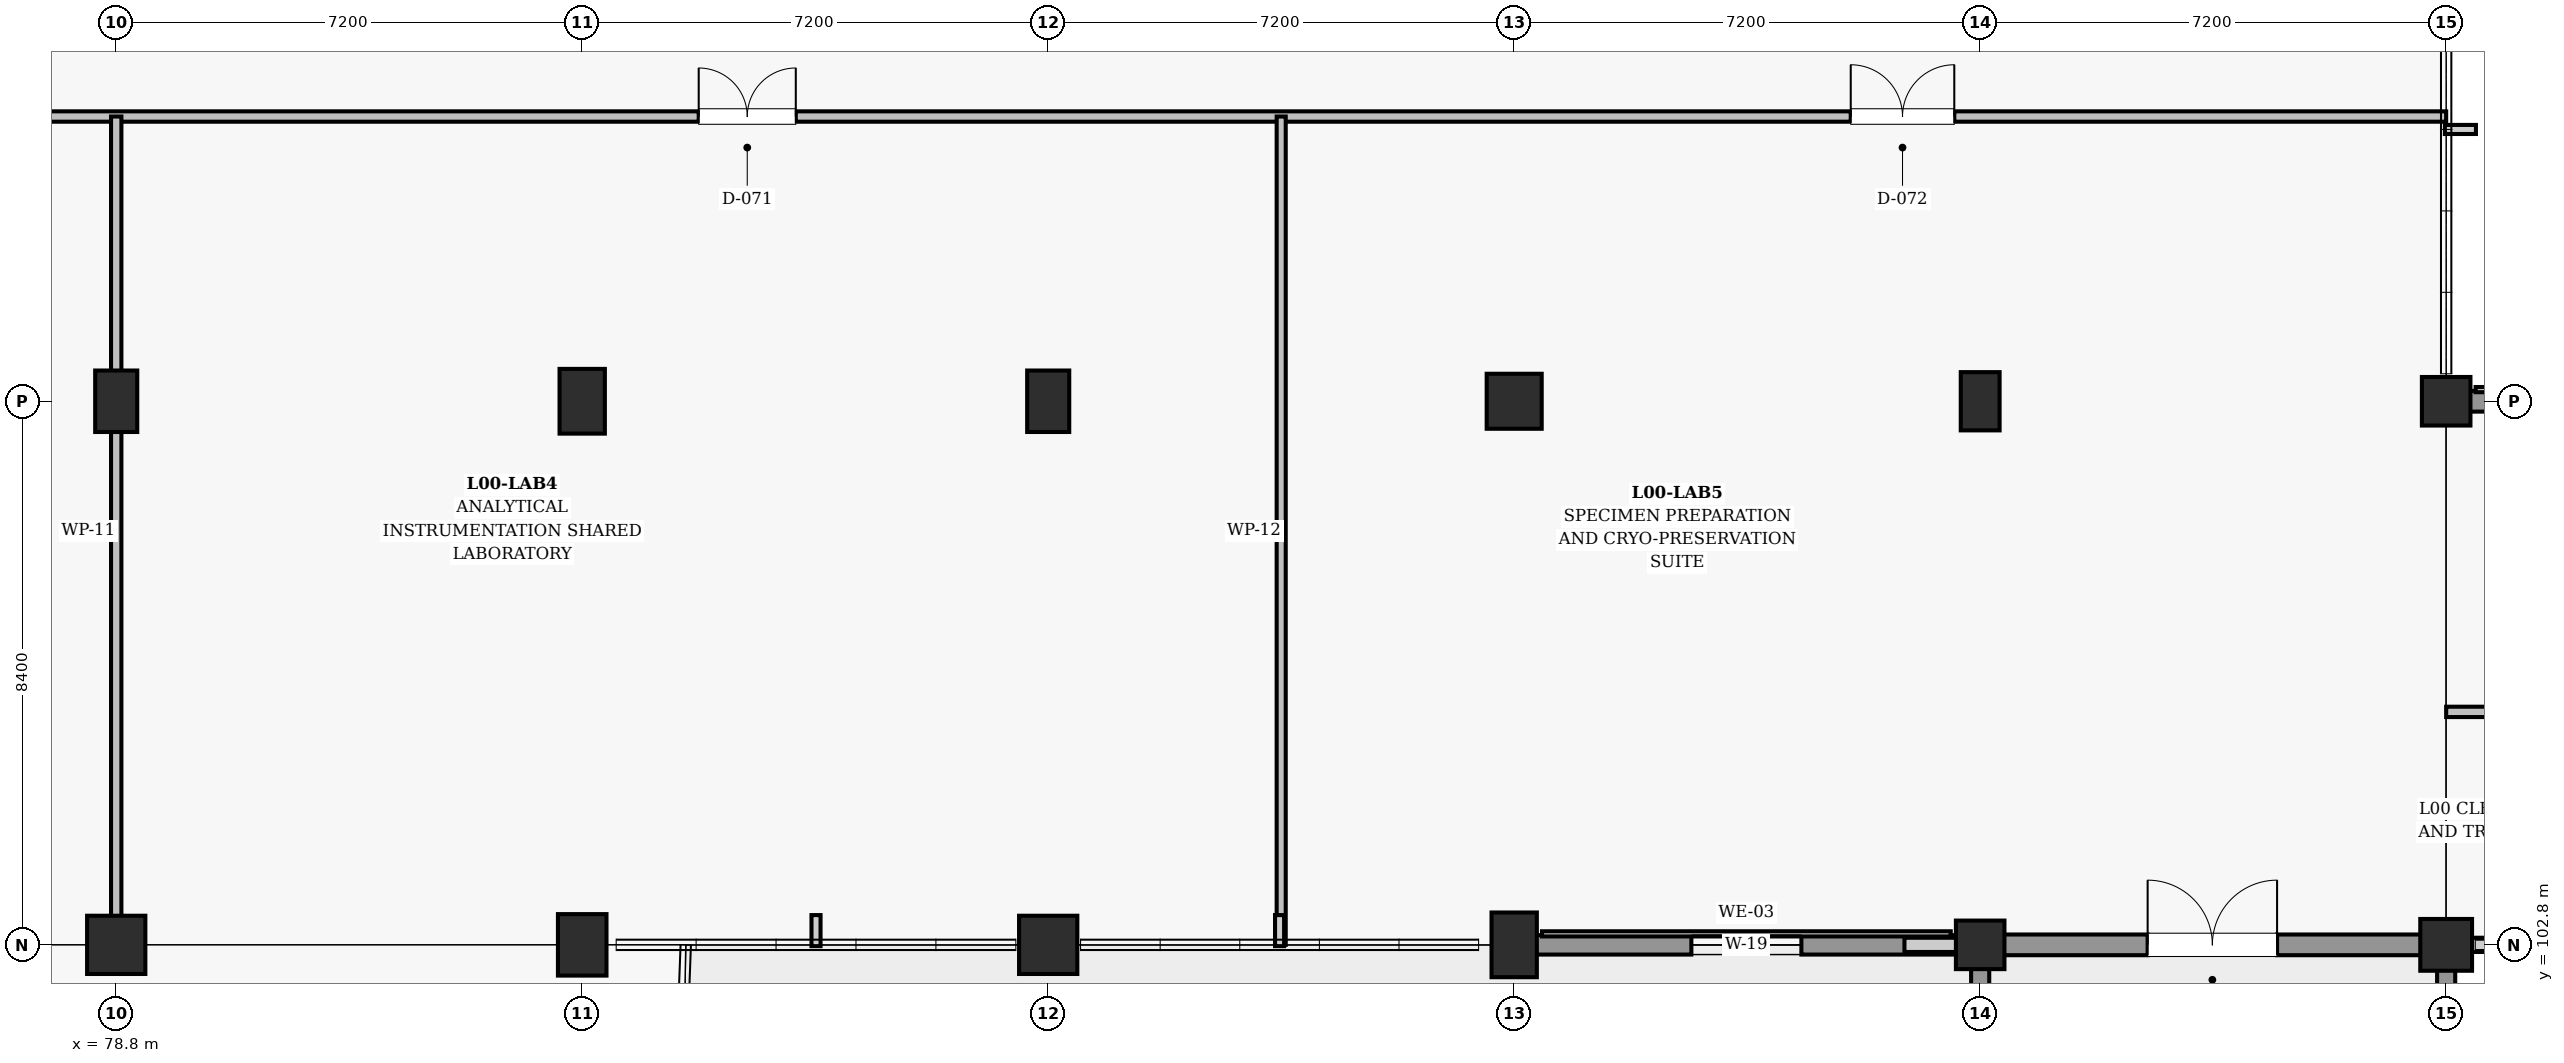
"""IFC4 building model, lengths in metres.
Left out: names, types, materials, properties, quantities, classifications, styles, units other than length and angle.
Written with IfcOpenShell. Run it as: python <this file> out.ifc"""

import sys

from ifc_helpers import new_model, si_unit, direction, frame, frame_2d, origin, origin_2d, place, context, subcontext, project, spatial, polyline, rectangle, outline, extrude, element, fill, save


model = new_model("IFC4")
c1 = context("Model", 3, precision=1e-05, world=origin(), true_north=direction((0.0, 1.0)))
c2 = subcontext(c1, "Body", "Model", "MODEL_VIEW")
j1 = project(units=[si_unit("LENGTHUNIT", "METRE"), si_unit("PLANEANGLEUNIT", "RADIAN")], contexts=[c1])
p1 = place(None, origin())
s1 = spatial("IfcSite", under=j1, at=p1, CompositionType="ELEMENT")
p2 = place(p1, origin())
s2 = spatial("IfcBuilding", under=s1, at=p2, CompositionType="ELEMENT")
p3 = place(p2, origin())
s3 = spatial("IfcBuildingStorey", under=s2, at=p3, CompositionType="ELEMENT", Elevation=0.0)
p4 = place(p3, frame((78.8, 102.8, 0.0), z_axis=(0.0, 0.0, 1.0), x_axis=(1.0, 0.0, 0.0)))
e1 = element("IfcColumn", 1, at=p4, inside=s3, PredefinedType="COLUMN", context=c2, shape_type="SweptSolid", body=[
    extrude(rectangle(XDim=0.9, YDim=0.9, at=origin_2d()), origin(), (0.0, 0.0, 1.0), 5.4),
])
p5 = place(p3, frame((78.8, 111.2, 0.0), z_axis=(0.0, 0.0, 1.0), x_axis=(1.0, 0.0, 0.0)))
e2 = element("IfcColumn", 2, at=p5, inside=s3, PredefinedType="COLUMN", context=c2, shape_type="SweptSolid", body=[
    extrude(rectangle(XDim=0.65, YDim=0.95, at=origin_2d()), origin(), (0.0, 0.0, 1.0), 5.4),
])
p6 = place(p3, frame((86.0, 102.8, 0.0), z_axis=(0.0, 0.0, 1.0), x_axis=(1.0, 0.0, 0.0)))
e3 = element("IfcColumn", 3, at=p6, inside=s3, PredefinedType="COLUMN", context=c2, shape_type="SweptSolid", body=[
    extrude(rectangle(XDim=0.75, YDim=0.95, at=origin_2d()), origin(), (0.0, 0.0, 1.0), 5.4),
])
p7 = place(p3, frame((86.0, 111.2, 0.0), z_axis=(0.0, 0.0, 1.0), x_axis=(1.0, 0.0, 0.0)))
e4 = element("IfcColumn", 4, at=p7, inside=s3, PredefinedType="COLUMN", context=c2, shape_type="SweptSolid", body=[
    extrude(rectangle(XDim=0.7, YDim=1.0, at=origin_2d()), origin(), (0.0, 0.0, 1.0), 5.4),
])
p8 = place(p3, frame((93.2, 102.8, 0.0), z_axis=(0.0, 0.0, 1.0), x_axis=(1.0, 0.0, 0.0)))
e5 = element("IfcColumn", 5, at=p8, inside=s3, PredefinedType="COLUMN", context=c2, shape_type="SweptSolid", body=[
    extrude(rectangle(XDim=0.9, YDim=0.9, at=origin_2d()), origin(), (0.0, 0.0, 1.0), 5.4),
])
p9 = place(p3, frame((93.2, 111.2, 0.0), z_axis=(0.0, 0.0, 1.0), x_axis=(1.0, 0.0, 0.0)))
e6 = element("IfcColumn", 6, at=p9, inside=s3, PredefinedType="COLUMN", context=c2, shape_type="SweptSolid", body=[
    extrude(rectangle(XDim=0.65, YDim=0.95, at=origin_2d()), origin(), (0.0, 0.0, 1.0), 5.4),
])
p10 = place(p3, frame((100.4, 102.8, 0.0), z_axis=(0.0, 0.0, 1.0), x_axis=(1.0, 0.0, 0.0)))
e7 = element("IfcColumn", 7, at=p10, inside=s3, PredefinedType="COLUMN", context=c2, shape_type="SweptSolid", body=[
    extrude(rectangle(XDim=0.7, YDim=1.0, at=origin_2d()), origin(), (0.0, 0.0, 1.0), 5.4),
])
p11 = place(p3, frame((100.4, 111.2, 0.0), z_axis=(0.0, 0.0, 1.0), x_axis=(1.0, 0.0, 0.0)))
e8 = element("IfcColumn", 8, at=p11, inside=s3, PredefinedType="COLUMN", context=c2, shape_type="SweptSolid", body=[
    extrude(rectangle(XDim=0.85, YDim=0.85, at=origin_2d()), origin(), (0.0, 0.0, 1.0), 5.4),
])
p12 = place(p3, frame((107.6, 102.8, 0.0), z_axis=(0.0, 0.0, 1.0), x_axis=(1.0, 0.0, 0.0)))
e9 = element("IfcColumn", 9, at=p12, inside=s3, PredefinedType="COLUMN", context=c2, shape_type="SweptSolid", body=[
    extrude(rectangle(XDim=0.75, YDim=0.75, at=origin_2d()), origin(), (0.0, 0.0, 1.0), 5.4),
])
p13 = place(p3, frame((107.6, 111.2, 0.0), z_axis=(0.0, 0.0, 1.0), x_axis=(1.0, 0.0, 0.0)))
e10 = element("IfcColumn", 10, at=p13, inside=s3, PredefinedType="COLUMN", context=c2, shape_type="SweptSolid", body=[
    extrude(rectangle(XDim=0.6, YDim=0.9, at=origin_2d()), origin(), (0.0, 0.0, 1.0), 5.4),
])
p14 = place(p3, frame((114.8, 102.8, 0.0), z_axis=(0.0, 0.0, 1.0), x_axis=(1.0, 0.0, 0.0)))
e11 = element("IfcColumn", 11, at=p14, inside=s3, PredefinedType="COLUMN", context=c2, shape_type="SweptSolid", body=[
    extrude(rectangle(XDim=0.8, YDim=0.8, at=origin_2d()), origin(), (0.0, 0.0, 1.0), 5.4),
])
p15 = place(p3, frame((114.8, 111.2, 0.0), z_axis=(0.0, 0.0, 1.0), x_axis=(1.0, 0.0, 0.0)))
e12 = element("IfcColumn", 12, at=p15, inside=s3, PredefinedType="COLUMN", context=c2, shape_type="SweptSolid", body=[
    extrude(rectangle(XDim=0.75, YDim=0.75, at=origin_2d()), origin(), (0.0, 0.0, 1.0), 5.4),
])
p16 = place(p3, frame((100.73, 102.8, 0.0), z_axis=(0.0, 0.0, 1.0), x_axis=(1.0, 0.0, 0.0)))
e13 = element("IfcWall", 13, at=p16, inside=s3, PredefinedType="SOLIDWALL", context=c2, shape_type="SweptSolid", body=[
    extrude(rectangle(XDim=6.515, YDim=0.3, at=frame_2d((3.258, 0.0))), origin(), (0.0, 0.0, 1.0), 3.855),
])
p17 = place(p16, frame((2.407, 0.0, 0.95)))
e14 = element("IfcOpeningElement", 14, at=p17, cuts=e13, PredefinedType="OPENING", context=c2, shape_type="SweptSolid", body=[
    extrude(rectangle(XDim=1.7, YDim=2.55, at=frame_2d((0.85, 1.275))), frame((0.0, 0.16, 0.0), z_axis=(0.0, -1.0, 0.0), x_axis=(1.0, 0.0, 0.0)), (0.0, 0.0, 1.0), 0.32),
])
p18 = place(p3, frame((107.955, 102.8, 0.0), z_axis=(0.0, 0.0, 1.0), x_axis=(1.0, 0.0, 0.0)))
e15 = element("IfcWall", 15, at=p18, inside=s3, PredefinedType="SOLIDWALL", context=c2, shape_type="SweptSolid", body=[
    extrude(rectangle(XDim=6.465, YDim=0.32, at=frame_2d((3.232, 0.0))), origin(), (0.0, 0.0, 1.0), 3.815),
])
p19 = place(p18, frame((2.232, 0.0, 0.0)))
e16 = element("IfcOpeningElement", 16, at=p19, cuts=e15, PredefinedType="OPENING", context=c2, shape_type="SweptSolid", body=[
    extrude(rectangle(XDim=2.0, YDim=2.4, at=frame_2d((1.0, 1.2))), frame((0.0, 0.17, 0.0), z_axis=(0.0, -1.0, 0.0), x_axis=(1.0, 0.0, 0.0)), (0.0, 0.0, 1.0), 0.34),
])
for number, where, z_axis, x_axis in (
    (17, (107.6, 94.615, 3.3), (0.0, 0.0, 1.0), (0.0, 1.0, 0.0)),
    (18, (114.8, 94.59, 3.3), (0.0, 0.0, 1.0), (0.0, 1.0, 0.0)),
):
    element("IfcWall", number, at=place(p3, frame(where, z_axis=z_axis, x_axis=x_axis)), inside=s3, PredefinedType="SOLIDWALL", context=c2, shape_type="SweptSolid", body=[
        extrude(outline(polyline([(0.0, 0.0), (2.04, 0.52), (3.923, 1.06), (5.805, 0.52), (7.845, 0.0), (7.845, 1.12), (0.0, 1.12), (0.0, 0.0)])), frame((0.0, 0.14, 0.0), z_axis=(0.0, -1.0, 0.0), x_axis=(1.0, 0.0, 0.0)), (0.0, 0.0, 1.0), 0.28),
    ])
p20 = place(p3, frame((115.155, 111.2, 0.0), z_axis=(0.0, 0.0, 1.0), x_axis=(1.0, 0.0, 0.0)))
e19 = element("IfcWall", 19, at=p20, inside=s3, PredefinedType="SOLIDWALL", context=c2, shape_type="SweptSolid", body=[
    extrude(rectangle(XDim=6.59, YDim=0.32, at=frame_2d((3.295, 0.0))), origin(), (0.0, 0.0, 1.0), 3.815),
])
p21 = place(p20, frame((2.545, 0.0, 1.85)))
e20 = element("IfcOpeningElement", 20, at=p21, cuts=e19, PredefinedType="OPENING", context=c2, shape_type="SweptSolid", body=[
    extrude(rectangle(XDim=1.5, YDim=1.1, at=frame_2d((0.75, 0.55))), frame((0.0, 0.17, 0.0), z_axis=(0.0, -1.0, 0.0), x_axis=(1.0, 0.0, 0.0)), (0.0, 0.0, 1.0), 0.34),
])
p22 = place(p3, frame((14.0, 115.6, 0.0), z_axis=(0.0, 0.0, 1.0), x_axis=(1.0, 0.0, 0.0)))
e21 = element("IfcWall", 21, at=p22, inside=s3, PredefinedType="PARTITIONING", context=c2, shape_type="SweptSolid", body=[
    extrude(rectangle(XDim=100.8, YDim=0.16, at=frame_2d((50.4, 0.0))), origin(), (0.0, 0.0, 1.0), 3.82),
])
p23 = place(p22, frame((11.0, 0.0, 0.0)))
e22 = element("IfcOpeningElement", 22, at=p23, cuts=e21, PredefinedType="OPENING", context=c2, shape_type="SweptSolid", body=[
    extrude(rectangle(XDim=1.75, YDim=2.25, at=frame_2d((0.875, 1.125))), frame((0.0, 0.09, 0.0), z_axis=(0.0, -1.0, 0.0), x_axis=(1.0, 0.0, 0.0)), (0.0, 0.0, 1.0), 0.18),
])
p24 = place(p22, frame((32.4, 0.0, 0.0)))
e23 = element("IfcOpeningElement", 23, at=p24, cuts=e21, PredefinedType="OPENING", context=c2, shape_type="SweptSolid", body=[
    extrude(rectangle(XDim=1.5, YDim=2.25, at=frame_2d((0.75, 1.125))), frame((0.0, 0.09, 0.0), z_axis=(0.0, -1.0, 0.0), x_axis=(1.0, 0.0, 0.0)), (0.0, 0.0, 1.0), 0.18),
])
p25 = place(p22, frame((54.0, 0.0, 0.0)))
e24 = element("IfcOpeningElement", 24, at=p25, cuts=e21, PredefinedType="OPENING", context=c2, shape_type="SweptSolid", body=[
    extrude(rectangle(XDim=1.5, YDim=2.25, at=frame_2d((0.75, 1.125))), frame((0.0, 0.09, 0.0), z_axis=(0.0, -1.0, 0.0), x_axis=(1.0, 0.0, 0.0)), (0.0, 0.0, 1.0), 0.18),
])
p26 = place(p22, frame((73.8, 0.0, 0.0)))
e25 = element("IfcOpeningElement", 25, at=p26, cuts=e21, PredefinedType="OPENING", context=c2, shape_type="SweptSolid", body=[
    extrude(rectangle(XDim=1.5, YDim=2.25, at=frame_2d((0.75, 1.125))), frame((0.0, 0.09, 0.0), z_axis=(0.0, -1.0, 0.0), x_axis=(1.0, 0.0, 0.0)), (0.0, 0.0, 1.0), 0.18),
])
p27 = place(p22, frame((91.6, 0.0, 0.0)))
e26 = element("IfcOpeningElement", 26, at=p27, cuts=e21, PredefinedType="OPENING", context=c2, shape_type="SweptSolid", body=[
    extrude(rectangle(XDim=1.6, YDim=2.25, at=frame_2d((0.8, 1.125))), frame((0.0, 0.09, 0.0), z_axis=(0.0, -1.0, 0.0), x_axis=(1.0, 0.0, 0.0)), (0.0, 0.0, 1.0), 0.18),
])
p28 = place(p3, frame((78.8, 102.8, 0.0), z_axis=(0.0, 0.0, 1.0), x_axis=(0.0, 1.0, 0.0)))
e27 = element("IfcWall", 27, at=p28, inside=s3, PredefinedType="PARTITIONING", context=c2, shape_type="SweptSolid", body=[
    extrude(rectangle(XDim=12.8, YDim=0.16, at=frame_2d((6.4, 0.0))), origin(), (0.0, 0.0, 1.0), 3.86),
])
p29 = place(p3, frame((96.8, 102.8, 0.0), z_axis=(0.0, 0.0, 1.0), x_axis=(0.0, 1.0, 0.0)))
e28 = element("IfcWall", 28, at=p29, inside=s3, PredefinedType="PARTITIONING", context=c2, shape_type="SweptSolid", body=[
    extrude(rectangle(XDim=12.8, YDim=0.14, at=frame_2d((6.4, 0.0))), origin(), (0.0, 0.0, 1.0), 4.41),
])
p30 = place(p3, frame((114.8, 106.4, 0.0), z_axis=(0.0, 0.0, 1.0), x_axis=(1.0, 0.0, 0.0)))
e29 = element("IfcWall", 29, at=p30, inside=s3, PredefinedType="PARTITIONING", context=c2, shape_type="SweptSolid", body=[
    extrude(rectangle(XDim=35.0, YDim=0.16, at=frame_2d((17.5, 0.0))), origin(), (0.0, 0.0, 1.0), 3.82),
])
p31 = place(p30, frame((6.7, 0.0, 0.0)))
e30 = element("IfcOpeningElement", 30, at=p31, cuts=e29, PredefinedType="OPENING", context=c2, shape_type="SweptSolid", body=[
    extrude(rectangle(XDim=1.1, YDim=2.15, at=frame_2d((0.55, 1.075))), frame((0.0, 0.09, 0.0), z_axis=(0.0, -1.0, 0.0), x_axis=(1.0, 0.0, 0.0)), (0.0, 0.0, 1.0), 0.18),
])
p32 = place(p30, frame((20.4, 0.0, 0.0)))
e31 = element("IfcOpeningElement", 31, at=p32, cuts=e29, PredefinedType="OPENING", context=c2, shape_type="SweptSolid", body=[
    extrude(rectangle(XDim=1.75, YDim=2.25, at=frame_2d((0.875, 1.125))), frame((0.0, 0.09, 0.0), z_axis=(0.0, -1.0, 0.0), x_axis=(1.0, 0.0, 0.0)), (0.0, 0.0, 1.0), 0.18),
])
p33 = place(p30, frame((30.45, 0.0, 0.0)))
e32 = element("IfcOpeningElement", 32, at=p33, cuts=e29, PredefinedType="OPENING", context=c2, shape_type="SweptSolid", body=[
    extrude(rectangle(XDim=1.9, YDim=2.3, at=frame_2d((0.95, 1.15))), frame((0.0, 0.09, 0.0), z_axis=(0.0, -1.0, 0.0), x_axis=(1.0, 0.0, 0.0)), (0.0, 0.0, 1.0), 0.18),
])
p34 = place(p17, origin())
e33 = element("IfcWindow", 33, at=p34, inside=s3, PartitioningType="SINGLE_PANEL", PredefinedType="WINDOW", context=c2, shape_type="SweptSolid", body=[
    extrude(rectangle(XDim=1.7, YDim=2.55, at=frame_2d((0.85, 1.275))), frame((0.0, 0.03, 0.0), z_axis=(0.0, -1.0, 0.0), x_axis=(1.0, 0.0, 0.0)), (0.0, 0.0, 1.0), 0.06),
])
fill(e14, e33)
p35 = place(p19, origin())
e34 = element("IfcDoor", 34, at=p35, inside=s3, OperationType="DOUBLE_DOOR_SINGLE_SWING", PredefinedType="DOOR", context=c2, shape_type="SweptSolid", body=[
    extrude(rectangle(XDim=2.0, YDim=2.4, at=frame_2d((1.0, 1.2))), frame((0.0, 0.025, 0.0), z_axis=(0.0, -1.0, 0.0), x_axis=(1.0, 0.0, 0.0)), (0.0, 0.0, 1.0), 0.05),
])
fill(e16, e34)
p36 = place(p26, origin())
e35 = element("IfcDoor", 35, at=p36, inside=s3, OperationType="DOUBLE_DOOR_SINGLE_SWING", PredefinedType="DOOR", context=c2, shape_type="SweptSolid", body=[
    extrude(rectangle(XDim=1.5, YDim=2.25, at=frame_2d((0.75, 1.125))), frame((0.0, 0.025, 0.0), z_axis=(0.0, -1.0, 0.0), x_axis=(1.0, 0.0, 0.0)), (0.0, 0.0, 1.0), 0.05),
])
fill(e25, e35)
p37 = place(p27, origin())
e36 = element("IfcDoor", 36, at=p37, inside=s3, OperationType="DOUBLE_DOOR_SINGLE_SWING", PredefinedType="DOOR", context=c2, shape_type="SweptSolid", body=[
    extrude(rectangle(XDim=1.6, YDim=2.25, at=frame_2d((0.8, 1.125))), frame((0.0, 0.025, 0.0), z_axis=(0.0, -1.0, 0.0), x_axis=(1.0, 0.0, 0.0)), (0.0, 0.0, 1.0), 0.05),
])
fill(e26, e36)
save(model, sys.argv[1])
